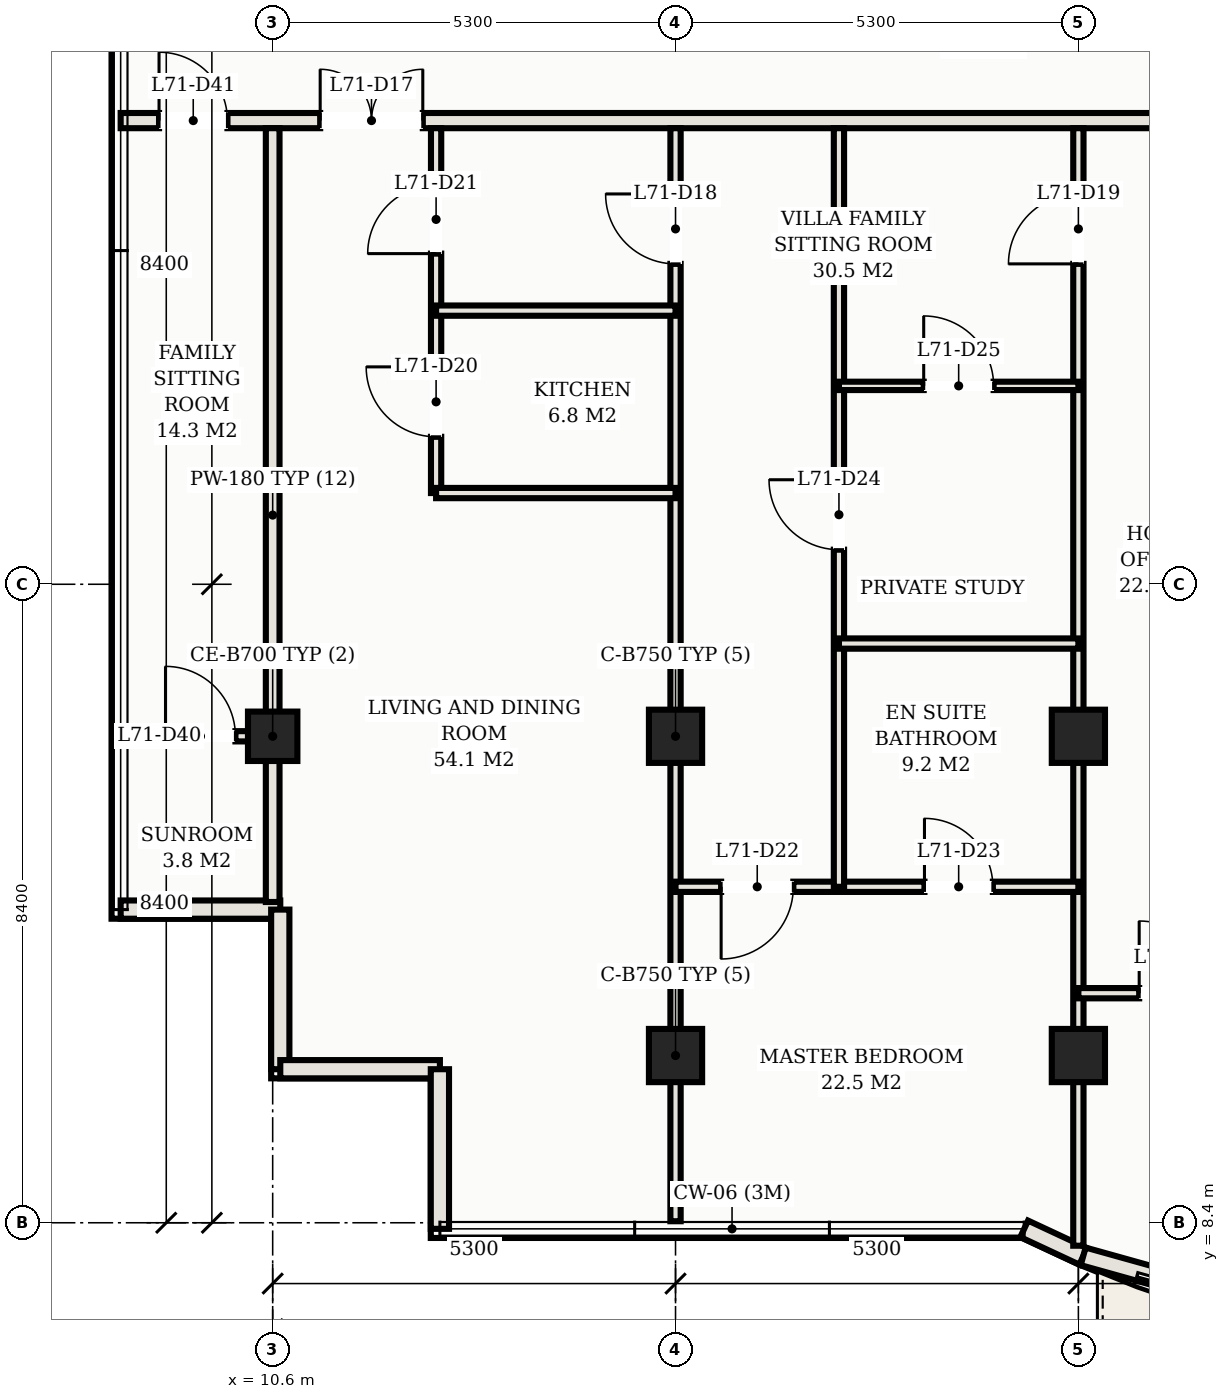
"""IFC4 building model, lengths in metres.
Left out: names, types, materials, properties, quantities, classifications, styles, units other than length and angle.
Written with IfcOpenShell. Run it as: python <this file> out.ifc"""

import sys

from ifc_helpers import new_model, si_unit, direction, frame, frame_2d, origin, origin_2d, place, context, subcontext, project, spatial, rectangle, hollow_rectangle, extrude, element, fill, save


model = new_model("IFC4")
c1 = context("Model", 3, precision=1e-05, world=origin(), true_north=direction((0.0, 1.0)))
c2 = subcontext(c1, "Body", "Model", "MODEL_VIEW")
j1 = project(units=[si_unit("LENGTHUNIT", "METRE"), si_unit("PLANEANGLEUNIT", "RADIAN")], contexts=[c1])
p1 = place(None, origin())
s1 = spatial("IfcSite", under=j1, at=p1, CompositionType="ELEMENT")
p2 = place(p1, origin())
s2 = spatial("IfcBuilding", under=s1, at=p2, CompositionType="ELEMENT")
p3 = place(p2, frame((0.0, 0.0, 256.1)))
s3 = spatial("IfcBuildingStorey", under=s2, at=p3, CompositionType="ELEMENT", Elevation=256.1)
for number, where, z_axis, x_axis in (
    (1, (15.9, 14.8, 0.0), (0.0, 0.0, 1.0), (1.0, 0.0, 0.0)),
    (2, (15.9, 10.6, 0.0), (0.0, 0.0, 1.0), (1.0, 0.0, 0.0)),
    (3, (21.2, 14.8, 0.0), (0.0, 0.0, 1.0), (1.0, 0.0, 0.0)),
    (4, (21.2, 10.6, 0.0), (0.0, 0.0, 1.0), (1.0, 0.0, 0.0)),
):
    element("IfcColumn", number, at=place(p3, frame(where, z_axis=z_axis, x_axis=x_axis)), inside=s3, PredefinedType="COLUMN", context=c2, shape_type="SweptSolid", body=[
        extrude(hollow_rectangle(XDim=0.7, YDim=0.7, WallThickness=0.025, at=origin_2d()), origin(), (0.0, 0.0, 1.0), 3.3),
    ])
p4 = place(p3, frame((10.6, 14.8, 0.0), z_axis=(0.0, 0.0, 1.0), x_axis=(1.0, 0.0, 0.0)))
e5 = element("IfcColumn", 5, at=p4, inside=s3, PredefinedType="COLUMN", context=c2, shape_type="SweptSolid", body=[
    extrude(hollow_rectangle(XDim=0.65, YDim=0.65, WallThickness=0.022, at=origin_2d()), origin(), (0.0, 0.0, 1.0), 3.3),
])
p5 = place(p3, frame((8.6, 12.52, 0.0), z_axis=(0.0, 0.0, 1.0), x_axis=(1.0, 0.0, 0.0)))
e6 = element("IfcWall", 6, at=p5, inside=s3, PredefinedType="SOLIDWALL", context=c2, shape_type="SweptSolid", body=[
    extrude(rectangle(XDim=2.1, YDim=0.24, at=frame_2d((1.05, 0.0))), origin(), (0.0, 0.0, 1.0), 3.11),
])
for number, where, z_axis, x_axis in (
    (7, (10.7, 12.52, 0.0), (0.0, 0.0, 1.0), (0.0, -1.0, 0.0)),
    (8, (10.7, 10.42, 0.0), (0.0, 0.0, 1.0), (1.0, 0.0, 0.0)),
):
    element("IfcWall", number, at=place(p3, frame(where, z_axis=z_axis, x_axis=x_axis)), inside=s3, PredefinedType="SOLIDWALL", context=c2, shape_type="SweptSolid", body=[
        extrude(rectangle(XDim=2.1, YDim=0.24, at=frame_2d((1.05, 0.0))), origin(), (0.0, 0.0, 1.0), 3.11),
    ])
p6 = place(p3, frame((12.8, 10.42, 0.0), z_axis=(0.0, 0.0, 1.0), x_axis=(0.0, -1.0, 0.0)))
e9 = element("IfcWall", 9, at=p6, inside=s3, PredefinedType="SOLIDWALL", context=c2, shape_type="SweptSolid", body=[
    extrude(rectangle(XDim=2.1, YDim=0.24, at=frame_2d((1.05, 0.0))), origin(), (0.0, 0.0, 1.0), 3.11),
])
p7 = place(p3, frame((20.487, 8.32, 0.0), z_axis=(0.0, 0.0, 1.0), x_axis=(0.906190424584, -0.422869855147, 0.0)))
e10 = element("IfcWall", 10, at=p7, inside=s3, PredefinedType="SOLIDWALL", context=c2, shape_type="SweptSolid", body=[
    extrude(rectangle(XDim=0.856, YDim=0.24, at=frame_2d((0.428, 0.0))), origin(), (0.0, 0.0, 1.0), 3.11),
])
p8 = place(p3, frame((21.263, 7.958, 0.0), z_axis=(0.0, 0.0, 1.0), x_axis=(0.963152398068, -0.268956238255, 0.0)))
e11 = element("IfcWall", 11, at=p8, inside=s3, PredefinedType="SOLIDWALL", context=c2, shape_type="SweptSolid", body=[
    extrude(rectangle(XDim=3.885, YDim=0.24, at=frame_2d((1.942, 0.0))), origin(), (0.0, 0.0, 1.0), 3.11),
])
p9 = place(p8, frame((1.074, 0.0, 0.0)))
e12 = element("IfcOpeningElement", 12, at=p9, cuts=e11, PredefinedType="OPENING", context=c2, shape_type="SweptSolid", body=[
    extrude(rectangle(XDim=1.8, YDim=2.2, at=frame_2d((0.9, 1.1))), frame((0.0, 0.13, 0.0), z_axis=(0.0, -1.0, 0.0), x_axis=(1.0, 0.0, 0.0)), (0.0, 0.0, 1.0), 0.26),
])
p10 = place(p3, frame((8.6, 22.9, 0.0), z_axis=(0.0, 0.0, 1.0), x_axis=(1.0, 0.0, 0.0)))
e13 = element("IfcWall", 13, at=p10, inside=s3, PredefinedType="PARTITIONING", context=c2, shape_type="SweptSolid", body=[
    extrude(rectangle(XDim=35.8, YDim=0.2, at=frame_2d((17.9, 0.0))), origin(), (0.0, 0.0, 1.0), 2.45),
])
p11 = place(p10, frame((2.625, 0.0, 0.0)))
e14 = element("IfcOpeningElement", 14, at=p11, cuts=e13, PredefinedType="OPENING", context=c2, shape_type="SweptSolid", body=[
    extrude(rectangle(XDim=1.35, YDim=2.33, at=frame_2d((0.675, 1.165))), frame((0.0, 0.11, 0.0), z_axis=(0.0, -1.0, 0.0), x_axis=(1.0, 0.0, 0.0)), (0.0, 0.0, 1.0), 0.22),
])
p12 = place(p10, frame((18.65, 0.0, 0.0)))
e15 = element("IfcOpeningElement", 15, at=p12, cuts=e13, PredefinedType="OPENING", context=c2, shape_type="SweptSolid", body=[
    extrude(rectangle(XDim=1.1, YDim=2.25, at=frame_2d((0.55, 1.125))), frame((0.0, 0.11, 0.0), z_axis=(0.0, -1.0, 0.0), x_axis=(1.0, 0.0, 0.0)), (0.0, 0.0, 1.0), 0.22),
])
p13 = place(p10, frame((29.25, 0.0, 0.0)))
e16 = element("IfcOpeningElement", 16, at=p13, cuts=e13, PredefinedType="OPENING", context=c2, shape_type="SweptSolid", body=[
    extrude(rectangle(XDim=1.1, YDim=2.25, at=frame_2d((0.55, 1.125))), frame((0.0, 0.11, 0.0), z_axis=(0.0, -1.0, 0.0), x_axis=(1.0, 0.0, 0.0)), (0.0, 0.0, 1.0), 0.22),
])
p14 = place(p10, frame((0.505, 0.0, 0.0)))
e17 = element("IfcOpeningElement", 17, at=p14, cuts=e13, PredefinedType="OPENING", context=c2, shape_type="SweptSolid", body=[
    extrude(rectangle(XDim=0.9, YDim=2.15, at=frame_2d((0.45, 1.075))), frame((0.0, 0.11, 0.0), z_axis=(0.0, -1.0, 0.0), x_axis=(1.0, 0.0, 0.0)), (0.0, 0.0, 1.0), 0.22),
])
p15 = place(p10, frame((34.395, 0.0, 0.0)))
e18 = element("IfcOpeningElement", 18, at=p15, cuts=e13, PredefinedType="OPENING", context=c2, shape_type="SweptSolid", body=[
    extrude(rectangle(XDim=0.9, YDim=2.15, at=frame_2d((0.45, 1.075))), frame((0.0, 0.11, 0.0), z_axis=(0.0, -1.0, 0.0), x_axis=(1.0, 0.0, 0.0)), (0.0, 0.0, 1.0), 0.22),
])
p16 = place(p3, frame((10.6, 12.62, 0.0), z_axis=(0.0, 0.0, 1.0), x_axis=(0.0, 1.0, 0.0)))
e19 = element("IfcWall", 19, at=p16, inside=s3, PredefinedType="PARTITIONING", context=c2, shape_type="SweptSolid", body=[
    extrude(rectangle(XDim=10.18, YDim=0.18, at=frame_2d((5.09, 0.0))), origin(), (0.0, 0.0, 1.0), 2.45),
])
p17 = place(p3, frame((15.9, 8.42, 0.0), z_axis=(0.0, 0.0, 1.0), x_axis=(0.0, 1.0, 0.0)))
e20 = element("IfcWall", 20, at=p17, inside=s3, PredefinedType="PARTITIONING", context=c2, shape_type="SweptSolid", body=[
    extrude(rectangle(XDim=14.38, YDim=0.135, at=frame_2d((7.19, 0.0))), origin(), (0.0, 0.0, 1.0), 2.45),
])
p18 = place(p17, frame((12.595, 0.0, 0.0)))
e21 = element("IfcOpeningElement", 21, at=p18, cuts=e20, PredefinedType="OPENING", context=c2, shape_type="SweptSolid", body=[
    extrude(rectangle(XDim=0.92, YDim=2.15, at=frame_2d((0.46, 1.075))), frame((0.0, 0.078, 0.0), z_axis=(0.0, -1.0, 0.0), x_axis=(1.0, 0.0, 0.0)), (0.0, 0.0, 1.0), 0.155),
])
p19 = place(p3, frame((21.2, 8.098, 0.0), z_axis=(0.0, 0.0, 1.0), x_axis=(0.0, 1.0, 0.0)))
e22 = element("IfcWall", 22, at=p19, inside=s3, PredefinedType="PARTITIONING", context=c2, shape_type="SweptSolid", body=[
    extrude(rectangle(XDim=14.702, YDim=0.135, at=frame_2d((7.351, 0.0))), origin(), (0.0, 0.0, 1.0), 2.45),
])
p20 = place(p19, frame((12.917, 0.0, 0.0)))
e23 = element("IfcOpeningElement", 23, at=p20, cuts=e22, PredefinedType="OPENING", context=c2, shape_type="SweptSolid", body=[
    extrude(rectangle(XDim=0.92, YDim=2.15, at=frame_2d((0.46, 1.075))), frame((0.0, 0.078, 0.0), z_axis=(0.0, -1.0, 0.0), x_axis=(1.0, 0.0, 0.0)), (0.0, 0.0, 1.0), 0.155),
])
p21 = place(p3, frame((12.75, 18.0, 0.0), z_axis=(0.0, 0.0, 1.0), x_axis=(0.0, 1.0, 0.0)))
e24 = element("IfcWall", 24, at=p21, inside=s3, PredefinedType="PARTITIONING", context=c2, shape_type="SweptSolid", body=[
    extrude(rectangle(XDim=4.8, YDim=0.135, at=frame_2d((2.4, 0.0))), origin(), (0.0, 0.0, 1.0), 2.45),
])
p22 = place(p21, frame((0.74, 0.0, 0.0)))
e25 = element("IfcOpeningElement", 25, at=p22, cuts=e24, PredefinedType="OPENING", context=c2, shape_type="SweptSolid", body=[
    extrude(rectangle(XDim=0.92, YDim=2.15, at=frame_2d((0.46, 1.075))), frame((0.0, 0.078, 0.0), z_axis=(0.0, -1.0, 0.0), x_axis=(1.0, 0.0, 0.0)), (0.0, 0.0, 1.0), 0.155),
])
p23 = place(p21, frame((3.15, 0.0, 0.0)))
e26 = element("IfcOpeningElement", 26, at=p23, cuts=e24, PredefinedType="OPENING", context=c2, shape_type="SweptSolid", body=[
    extrude(rectangle(XDim=0.9, YDim=2.15, at=frame_2d((0.45, 1.075))), frame((0.0, 0.078, 0.0), z_axis=(0.0, -1.0, 0.0), x_axis=(1.0, 0.0, 0.0)), (0.0, 0.0, 1.0), 0.155),
])
for number, where, z_axis, x_axis in (
    (27, (12.75, 18.0, 0.0), (0.0, 0.0, 1.0), (1.0, 0.0, 0.0)),
    (28, (12.75, 20.4, 0.0), (0.0, 0.0, 1.0), (1.0, 0.0, 0.0)),
):
    element("IfcWall", number, at=place(p3, frame(where, z_axis=z_axis, x_axis=x_axis)), inside=s3, PredefinedType="PARTITIONING", context=c2, shape_type="SweptSolid", body=[
        extrude(rectangle(XDim=3.15, YDim=0.135, at=frame_2d((1.575, 0.0))), origin(), (0.0, 0.0, 1.0), 2.45),
    ])
p24 = place(p3, frame((15.9, 12.82, 0.0), z_axis=(0.0, 0.0, 1.0), x_axis=(1.0, 0.0, 0.0)))
e29 = element("IfcWall", 29, at=p24, inside=s3, PredefinedType="PARTITIONING", context=c2, shape_type="SweptSolid", body=[
    extrude(rectangle(XDim=5.3, YDim=0.135, at=frame_2d((2.65, 0.0))), origin(), (0.0, 0.0, 1.0), 2.45),
])
p25 = place(p24, frame((0.6, 0.0, 0.0)))
e30 = element("IfcOpeningElement", 30, at=p25, cuts=e29, PredefinedType="OPENING", context=c2, shape_type="SweptSolid", body=[
    extrude(rectangle(XDim=0.95, YDim=2.15, at=frame_2d((0.475, 1.075))), frame((0.0, 0.078, 0.0), z_axis=(0.0, -1.0, 0.0), x_axis=(1.0, 0.0, 0.0)), (0.0, 0.0, 1.0), 0.155),
])
p26 = place(p24, frame((3.275, 0.0, 0.0)))
e31 = element("IfcOpeningElement", 31, at=p26, cuts=e29, PredefinedType="OPENING", context=c2, shape_type="SweptSolid", body=[
    extrude(rectangle(XDim=0.9, YDim=2.15, at=frame_2d((0.45, 1.075))), frame((0.0, 0.078, 0.0), z_axis=(0.0, -1.0, 0.0), x_axis=(1.0, 0.0, 0.0)), (0.0, 0.0, 1.0), 0.155),
])
p27 = place(p3, frame((18.05, 12.82, 0.0), z_axis=(0.0, 0.0, 1.0), x_axis=(0.0, 1.0, 0.0)))
e32 = element("IfcWall", 32, at=p27, inside=s3, PredefinedType="PARTITIONING", context=c2, shape_type="SweptSolid", body=[
    extrude(rectangle(XDim=9.98, YDim=0.135, at=frame_2d((4.99, 0.0))), origin(), (0.0, 0.0, 1.0), 2.45),
])
p28 = place(p27, frame((4.435, 0.0, 0.0)))
e33 = element("IfcOpeningElement", 33, at=p28, cuts=e32, PredefinedType="OPENING", context=c2, shape_type="SweptSolid", body=[
    extrude(rectangle(XDim=0.92, YDim=2.15, at=frame_2d((0.46, 1.075))), frame((0.0, 0.078, 0.0), z_axis=(0.0, -1.0, 0.0), x_axis=(1.0, 0.0, 0.0)), (0.0, 0.0, 1.0), 0.155),
])
p29 = place(p3, frame((18.05, 16.02, 0.0), z_axis=(0.0, 0.0, 1.0), x_axis=(1.0, 0.0, 0.0)))
e34 = element("IfcWall", 34, at=p29, inside=s3, PredefinedType="PARTITIONING", context=c2, shape_type="SweptSolid", body=[
    extrude(rectangle(XDim=3.15, YDim=0.135, at=frame_2d((1.575, 0.0))), origin(), (0.0, 0.0, 1.0), 2.45),
])
p30 = place(p3, frame((18.05, 19.41, 0.0), z_axis=(0.0, 0.0, 1.0), x_axis=(1.0, 0.0, 0.0)))
e35 = element("IfcWall", 35, at=p30, inside=s3, PredefinedType="MOVABLE", context=c2, shape_type="SweptSolid", body=[
    extrude(rectangle(XDim=3.15, YDim=0.11, at=frame_2d((1.575, 0.0))), origin(), (0.0, 0.0, 1.0), 2.45),
])
p31 = place(p30, frame((1.115, 0.0, 0.0)))
e36 = element("IfcOpeningElement", 36, at=p31, cuts=e35, PredefinedType="OPENING", context=c2, shape_type="SweptSolid", body=[
    extrude(rectangle(XDim=0.92, YDim=2.15, at=frame_2d((0.46, 1.075))), frame((0.0, 0.065, 0.0), z_axis=(0.0, -1.0, 0.0), x_axis=(1.0, 0.0, 0.0)), (0.0, 0.0, 1.0), 0.13),
])
p32 = place(p3, frame((21.2, 11.42, 0.0), z_axis=(0.0, 0.0, 1.0), x_axis=(1.0, 0.0, 0.0)))
e37 = element("IfcWall", 37, at=p32, inside=s3, PredefinedType="PARTITIONING", context=c2, shape_type="SweptSolid", body=[
    extrude(rectangle(XDim=5.3, YDim=0.135, at=frame_2d((2.65, 0.0))), origin(), (0.0, 0.0, 1.0), 2.45),
])
p33 = place(p32, frame((0.8, 0.0, 0.0)))
e38 = element("IfcOpeningElement", 38, at=p33, cuts=e37, PredefinedType="OPENING", context=c2, shape_type="SweptSolid", body=[
    extrude(rectangle(XDim=0.95, YDim=2.15, at=frame_2d((0.475, 1.075))), frame((0.0, 0.078, 0.0), z_axis=(0.0, -1.0, 0.0), x_axis=(1.0, 0.0, 0.0)), (0.0, 0.0, 1.0), 0.155),
])
p34 = place(p3, frame((8.7, 14.8, 0.0), z_axis=(0.0, 0.0, 1.0), x_axis=(1.0, 0.0, 0.0)))
e39 = element("IfcWall", 39, at=p34, inside=s3, PredefinedType="PARTITIONING", context=c2, shape_type="SweptSolid", body=[
    extrude(rectangle(XDim=1.9, YDim=0.135, at=frame_2d((0.95, 0.0))), origin(), (0.0, 0.0, 1.0), 2.45),
])
p35 = place(p34, frame((0.49, 0.0, 0.0)))
e40 = element("IfcOpeningElement", 40, at=p35, cuts=e39, PredefinedType="OPENING", context=c2, shape_type="SweptSolid", body=[
    extrude(rectangle(XDim=0.92, YDim=2.15, at=frame_2d((0.46, 1.075))), frame((0.0, 0.078, 0.0), z_axis=(0.0, -1.0, 0.0), x_axis=(1.0, 0.0, 0.0)), (0.0, 0.0, 1.0), 0.155),
])
p36 = place(p11, origin())
e41 = element("IfcDoor", 41, at=p36, inside=s3, OperationType="DOUBLE_DOOR_SINGLE_SWING", PredefinedType="DOOR", context=c2, shape_type="SweptSolid", body=[
    extrude(rectangle(XDim=1.35, YDim=2.33, at=frame_2d((0.675, 1.165))), frame((0.0, 0.025, 0.0), z_axis=(0.0, -1.0, 0.0), x_axis=(1.0, 0.0, 0.0)), (0.0, 0.0, 1.0), 0.05),
])
fill(e14, e41)
p37 = place(p18, origin())
e42 = element("IfcDoor", 42, at=p37, inside=s3, OperationType="SINGLE_SWING_RIGHT", PredefinedType="DOOR", context=c2, shape_type="SweptSolid", body=[
    extrude(rectangle(XDim=0.92, YDim=2.15, at=frame_2d((0.46, 1.075))), frame((0.0, 0.025, 0.0), z_axis=(0.0, -1.0, 0.0), x_axis=(1.0, 0.0, 0.0)), (0.0, 0.0, 1.0), 0.05),
])
fill(e21, e42)
p38 = place(p20, origin())
e43 = element("IfcDoor", 43, at=p38, inside=s3, OperationType="SINGLE_SWING_LEFT", PredefinedType="DOOR", context=c2, shape_type="SweptSolid", body=[
    extrude(rectangle(XDim=0.92, YDim=2.15, at=frame_2d((0.46, 1.075))), frame((0.0, 0.025, 0.0), z_axis=(0.0, -1.0, 0.0), x_axis=(1.0, 0.0, 0.0)), (0.0, 0.0, 1.0), 0.05),
])
fill(e23, e43)
p39 = place(p22, origin())
e44 = element("IfcDoor", 44, at=p39, inside=s3, OperationType="SINGLE_SWING_RIGHT", PredefinedType="DOOR", context=c2, shape_type="SweptSolid", body=[
    extrude(rectangle(XDim=0.92, YDim=2.15, at=frame_2d((0.46, 1.075))), frame((0.0, 0.025, 0.0), z_axis=(0.0, -1.0, 0.0), x_axis=(1.0, 0.0, 0.0)), (0.0, 0.0, 1.0), 0.05),
])
fill(e25, e44)
p40 = place(p23, origin())
e45 = element("IfcDoor", 45, at=p40, inside=s3, OperationType="SINGLE_SWING_LEFT", PredefinedType="DOOR", context=c2, shape_type="SweptSolid", body=[
    extrude(rectangle(XDim=0.9, YDim=2.15, at=frame_2d((0.45, 1.075))), frame((0.0, 0.025, 0.0), z_axis=(0.0, -1.0, 0.0), x_axis=(1.0, 0.0, 0.0)), (0.0, 0.0, 1.0), 0.05),
])
fill(e26, e45)
p41 = place(p25, frame((0.95, 0.0, 0.0), z_axis=(0.0, 0.0, 1.0), x_axis=(-1.0, 0.0, 0.0)))
e46 = element("IfcDoor", 46, at=p41, inside=s3, OperationType="SINGLE_SWING_RIGHT", PredefinedType="DOOR", context=c2, shape_type="SweptSolid", body=[
    extrude(rectangle(XDim=0.95, YDim=2.15, at=frame_2d((0.475, 1.075))), frame((0.0, 0.025, 0.0), z_axis=(0.0, -1.0, 0.0), x_axis=(1.0, 0.0, 0.0)), (0.0, 0.0, 1.0), 0.05),
])
fill(e30, e46)
p42 = place(p26, origin())
e47 = element("IfcDoor", 47, at=p42, inside=s3, OperationType="SINGLE_SWING_LEFT", PredefinedType="DOOR", context=c2, shape_type="SweptSolid", body=[
    extrude(rectangle(XDim=0.9, YDim=2.15, at=frame_2d((0.45, 1.075))), frame((0.0, 0.025, 0.0), z_axis=(0.0, -1.0, 0.0), x_axis=(1.0, 0.0, 0.0)), (0.0, 0.0, 1.0), 0.05),
])
fill(e31, e47)
p43 = place(p28, origin())
e48 = element("IfcDoor", 48, at=p43, inside=s3, OperationType="SINGLE_SWING_RIGHT", PredefinedType="DOOR", context=c2, shape_type="SweptSolid", body=[
    extrude(rectangle(XDim=0.92, YDim=2.15, at=frame_2d((0.46, 1.075))), frame((0.0, 0.025, 0.0), z_axis=(0.0, -1.0, 0.0), x_axis=(1.0, 0.0, 0.0)), (0.0, 0.0, 1.0), 0.05),
])
fill(e33, e48)
p44 = place(p31, origin())
e49 = element("IfcDoor", 49, at=p44, inside=s3, OperationType="SINGLE_SWING_LEFT", PredefinedType="DOOR", context=c2, shape_type="SweptSolid", body=[
    extrude(rectangle(XDim=0.92, YDim=2.15, at=frame_2d((0.46, 1.075))), frame((0.0, 0.025, 0.0), z_axis=(0.0, -1.0, 0.0), x_axis=(1.0, 0.0, 0.0)), (0.0, 0.0, 1.0), 0.05),
])
fill(e36, e49)
p45 = place(p33, origin())
e50 = element("IfcDoor", 50, at=p45, inside=s3, OperationType="SINGLE_SWING_LEFT", PredefinedType="DOOR", context=c2, shape_type="SweptSolid", body=[
    extrude(rectangle(XDim=0.95, YDim=2.15, at=frame_2d((0.475, 1.075))), frame((0.0, 0.025, 0.0), z_axis=(0.0, -1.0, 0.0), x_axis=(1.0, 0.0, 0.0)), (0.0, 0.0, 1.0), 0.05),
])
fill(e38, e50)
p46 = place(p35, origin())
e51 = element("IfcDoor", 51, at=p46, inside=s3, OperationType="SINGLE_SWING_LEFT", PredefinedType="DOOR", context=c2, shape_type="SweptSolid", body=[
    extrude(rectangle(XDim=0.92, YDim=2.15, at=frame_2d((0.46, 1.075))), frame((0.0, 0.025, 0.0), z_axis=(0.0, -1.0, 0.0), x_axis=(1.0, 0.0, 0.0)), (0.0, 0.0, 1.0), 0.05),
])
fill(e40, e51)
p47 = place(p14, origin())
e52 = element("IfcDoor", 52, at=p47, inside=s3, OperationType="SINGLE_SWING_LEFT", PredefinedType="DOOR", context=c2, shape_type="SweptSolid", body=[
    extrude(rectangle(XDim=0.9, YDim=2.15, at=frame_2d((0.45, 1.075))), frame((0.0, 0.025, 0.0), z_axis=(0.0, -1.0, 0.0), x_axis=(1.0, 0.0, 0.0)), (0.0, 0.0, 1.0), 0.05),
])
fill(e17, e52)
save(model, sys.argv[1])
